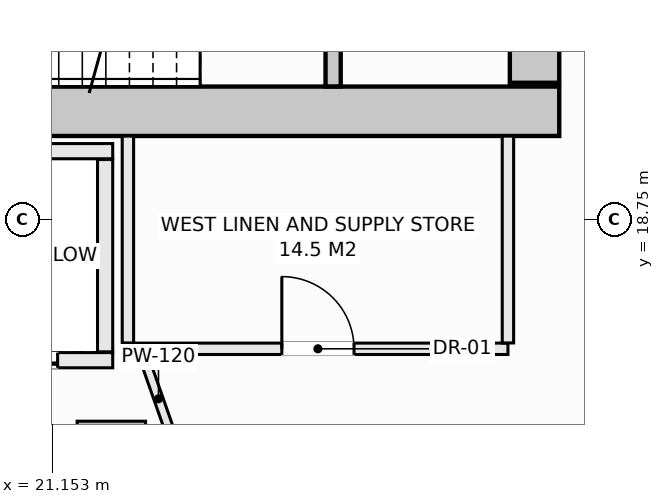
"""IFC4 building model, lengths in metres.
Left out: names, types, materials, properties, quantities, classifications, styles, units other than length and angle.
Written with IfcOpenShell. Run it as: python <this file> out.ifc"""

import sys

from ifc_helpers import new_model, si_unit, direction, frame, frame_2d, origin, origin_2d, place, context, subcontext, project, spatial, rectangle, extrude, element, fill, save


model = new_model("IFC4")
c1 = context("Model", 3, precision=1e-05, world=origin(), true_north=direction((0.0, 1.0)))
c2 = subcontext(c1, "Body", "Model", "MODEL_VIEW")
j1 = project(units=[si_unit("LENGTHUNIT", "METRE"), si_unit("PLANEANGLEUNIT", "RADIAN")], contexts=[c1])
p1 = place(None, origin())
s1 = spatial("IfcSite", under=j1, at=p1, CompositionType="ELEMENT")
p2 = place(p1, origin())
s2 = spatial("IfcBuilding", under=s1, at=p2, CompositionType="ELEMENT")
p3 = place(p2, frame((0.0, 0.0, 105.3)))
s3 = spatial("IfcBuildingStorey", under=s2, at=p3, CompositionType="ELEMENT", Elevation=105.3)
p4 = place(p3, frame((14.175, 20.175, -0.27), z_axis=(0.0, 0.0, 1.0), x_axis=(1.0, 0.0, 0.0)))
e1 = element("IfcWall", 1, at=p4, inside=s3, PredefinedType="SHEAR", context=c2, shape_type="SweptSolid", body=[
    extrude(rectangle(XDim=13.65, YDim=0.65, at=frame_2d((6.825, 0.0))), origin(), (0.0, 0.0, 1.0), 3.4),
])
p5 = place(p3, frame((27.5, 20.55, -0.27), z_axis=(0.0, 0.0, 1.0), x_axis=(0.0, 1.0, 0.0)))
e2 = element("IfcWall", 2, at=p5, inside=s3, PredefinedType="SHEAR", context=c2, shape_type="SweptSolid", body=[
    extrude(rectangle(XDim=1.5, YDim=0.65, at=frame_2d((0.75, 0.0))), origin(), (0.0, 0.0, 1.0), 3.4),
])
p6 = place(p3, frame((21.932, 15.648, -0.27), z_axis=(0.0, 0.0, 1.0), x_axis=(1.0, 0.0, 0.0)))
e3 = element("IfcColumn", 3, at=p6, inside=s3, PredefinedType="COLUMN", context=c2, shape_type="SweptSolid", body=[
    extrude(rectangle(XDim=0.9, YDim=0.9, at=origin_2d()), origin(), (0.0, 0.0, 1.0), 3.4),
])
p7 = place(p3, frame((24.85, 20.502, -0.27), z_axis=(0.0, 0.0, 1.0), x_axis=(0.0, 1.0, 0.0)))
e4 = element("IfcWall", 4, at=p7, inside=s3, PredefinedType="SHEAR", context=c2, shape_type="SweptSolid", body=[
    extrude(rectangle(XDim=3.038, YDim=0.2, at=frame_2d((1.519, 0.0))), origin(), (0.0, 0.0, 1.0), 3.4),
])
p8 = place(p7, frame((0.969, 0.0, 0.27)))
e5 = element("IfcOpeningElement", 5, at=p8, cuts=e4, PredefinedType="OPENING", context=c2, shape_type="SweptSolid", body=[
    extrude(rectangle(XDim=1.1, YDim=2.15, at=frame_2d((0.55, 1.075))), frame((0.0, 0.11, 0.0), z_axis=(0.0, -1.0, 0.0), x_axis=(1.0, 0.0, 0.0)), (0.0, 0.0, 1.0), 0.22),
])
p9 = place(p3, frame((19.4, 19.65, 0.0), z_axis=(0.0, 0.0, 1.0), x_axis=(1.0, 0.0, 0.0)))
e6 = element("IfcWall", 6, at=p9, inside=s3, PredefinedType="SOLIDWALL", context=c2, shape_type="SweptSolid", body=[
    extrude(rectangle(XDim=2.55, YDim=0.2, at=frame_2d((1.275, 0.0))), origin(), (0.0, 0.0, 1.0), 3.13),
])
p10 = place(p3, frame((19.4, 16.9, 0.0), z_axis=(0.0, 0.0, 1.0), x_axis=(1.0, 0.0, 0.0)))
e7 = element("IfcWall", 7, at=p10, inside=s3, PredefinedType="SOLIDWALL", context=c2, shape_type="SweptSolid", body=[
    extrude(rectangle(XDim=2.55, YDim=0.2, at=frame_2d((1.275, 0.0))), origin(), (0.0, 0.0, 1.0), 3.13),
])
p11 = place(p10, frame((0.725, 0.0, 0.0)))
e8 = element("IfcOpeningElement", 8, at=p11, cuts=e7, PredefinedType="OPENING", context=c2, shape_type="SweptSolid", body=[
    extrude(rectangle(XDim=1.1, YDim=2.2, at=frame_2d((0.55, 1.1))), frame((0.0, 0.11, 0.0), z_axis=(0.0, -1.0, 0.0), x_axis=(1.0, 0.0, 0.0)), (0.0, 0.0, 1.0), 0.22),
])
p12 = place(p3, frame((21.85, 17.01, 0.0), z_axis=(0.0, 0.0, 1.0), x_axis=(0.0, 1.0, 0.0)))
e9 = element("IfcWall", 9, at=p12, inside=s3, PredefinedType="SOLIDWALL", context=c2, shape_type="SweptSolid", body=[
    extrude(rectangle(XDim=2.53, YDim=0.2, at=frame_2d((1.265, 0.0))), origin(), (0.0, 0.0, 1.0), 3.13),
])
p13 = place(p3, frame((22.15, 17.05, 0.0), z_axis=(0.0, 0.0, 1.0), x_axis=(1.0, 0.0, 0.0)))
e10 = element("IfcWall", 10, at=p13, inside=s3, PredefinedType="PARTITIONING", context=c2, shape_type="SweptSolid", body=[
    extrude(rectangle(XDim=5.0, YDim=0.15, at=frame_2d((2.5, 0.0))), origin(), (0.0, 0.0, 1.0), 3.13),
])
p14 = place(p13, frame((2.025, 0.0, 0.0)))
e11 = element("IfcOpeningElement", 11, at=p14, cuts=e10, PredefinedType="OPENING", context=c2, shape_type="SweptSolid", body=[
    extrude(rectangle(XDim=0.95, YDim=2.1, at=frame_2d((0.475, 1.05))), frame((0.0, 0.085, 0.0), z_axis=(0.0, -1.0, 0.0), x_axis=(1.0, 0.0, 0.0)), (0.0, 0.0, 1.0), 0.17),
])
for number, where, z_axis, x_axis in (
    (12, (22.15, 17.127, 0.0), (0.0, 0.0, 1.0), (0.0, 1.0, 0.0)),
    (13, (27.15, 17.127, 0.0), (0.0, 0.0, 1.0), (0.0, 1.0, 0.0)),
):
    element("IfcWall", number, at=place(p3, frame(where, z_axis=z_axis, x_axis=x_axis)), inside=s3, PredefinedType="PARTITIONING", context=c2, shape_type="SweptSolid", body=[
        extrude(rectangle(XDim=2.721, YDim=0.15, at=frame_2d((1.36, 0.0))), origin(), (0.0, 0.0, 1.0), 3.13),
    ])
p15 = place(p3, frame((22.348, 16.973, 0.0), z_axis=(0.0, 0.0, 1.0), x_axis=(0.331471687044, -0.943465166653, 0.0)))
e14 = element("IfcWall", 14, at=p15, inside=s3, PredefinedType="PARTITIONING", context=c2, shape_type="SweptSolid", body=[
    extrude(rectangle(XDim=1.231, YDim=0.12, at=frame_2d((0.616, 0.0))), origin(), (0.0, 0.0, 1.0), 3.13),
])
p16 = place(p11, origin())
e15 = element("IfcDoor", 15, at=p16, inside=s3, OperationType="SLIDING_TO_LEFT", PredefinedType="DOOR", context=c2, shape_type="SweptSolid", body=[
    extrude(rectangle(XDim=1.1, YDim=2.2, at=frame_2d((0.55, 1.1))), frame((0.0, 0.025, 0.0), z_axis=(0.0, -1.0, 0.0), x_axis=(1.0, 0.0, 0.0)), (0.0, 0.0, 1.0), 0.05),
])
fill(e8, e15)
p17 = place(p14, origin())
e16 = element("IfcDoor", 16, at=p17, inside=s3, OperationType="SINGLE_SWING_LEFT", PredefinedType="DOOR", context=c2, shape_type="SweptSolid", body=[
    extrude(rectangle(XDim=0.95, YDim=2.1, at=frame_2d((0.475, 1.05))), frame((0.0, 0.025, 0.0), z_axis=(0.0, -1.0, 0.0), x_axis=(1.0, 0.0, 0.0)), (0.0, 0.0, 1.0), 0.05),
])
fill(e11, e16)
save(model, sys.argv[1])
